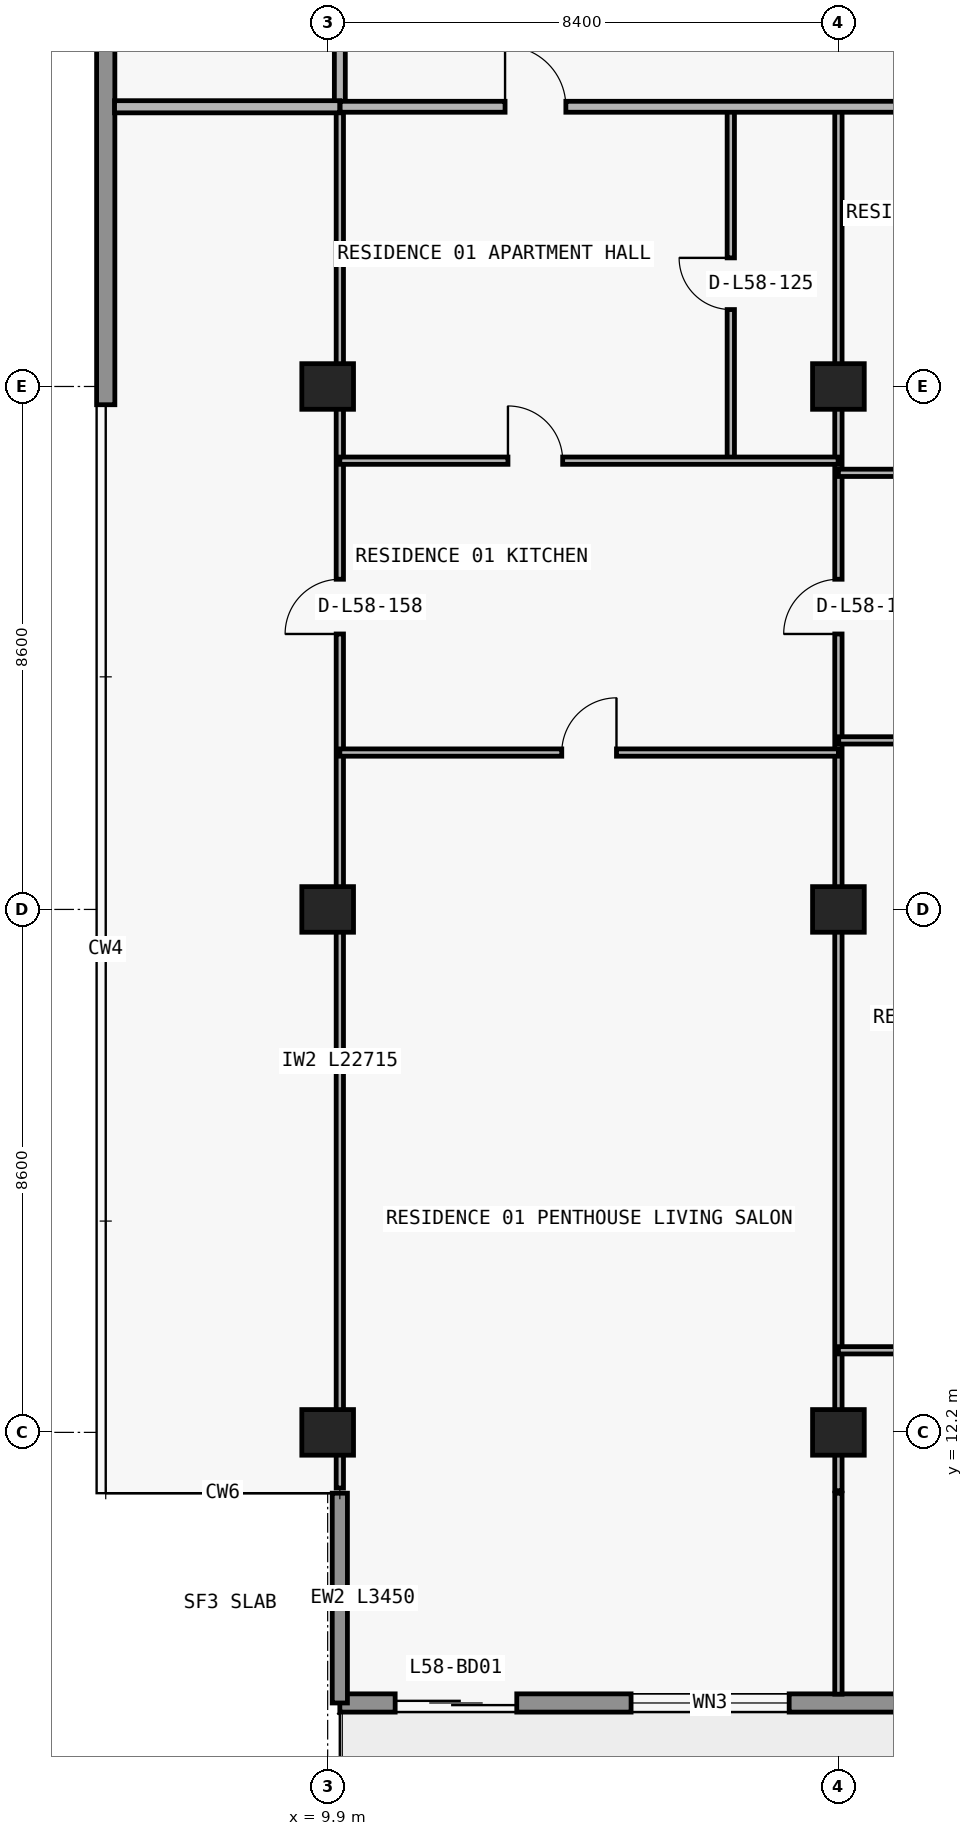
"""IFC4 building model, lengths in metres.
Left out: names, types, materials, properties, quantities, classifications, styles, units other than length and angle.
Written with IfcOpenShell. Run it as: python <this file> out.ifc"""

import sys

from ifc_helpers import new_model, si_unit, direction, frame, frame_2d, origin, origin_2d, place, context, subcontext, project, spatial, rectangle, extrude, element, fill, save


model = new_model("IFC4")
c1 = context("Model", 3, precision=1e-05, world=origin(), true_north=direction((0.0, 1.0)))
c2 = subcontext(c1, "Body", "Model", "MODEL_VIEW")
j1 = project(units=[si_unit("LENGTHUNIT", "METRE"), si_unit("PLANEANGLEUNIT", "RADIAN")], contexts=[c1])
p1 = place(None, origin())
s1 = spatial("IfcSite", under=j1, at=p1, CompositionType="ELEMENT")
p2 = place(p1, origin())
s2 = spatial("IfcBuilding", under=s1, at=p2, CompositionType="ELEMENT")
p3 = place(p2, frame((0.0, 0.0, 208.2)))
s3 = spatial("IfcBuildingStorey", under=s2, at=p3, CompositionType="ELEMENT", Elevation=208.2)
for number, where, z_axis, x_axis in (
    (1, (9.9, 12.2, 0.0), (0.0, 0.0, 1.0), (1.0, 0.0, 0.0)),
    (2, (18.3, 12.2, 0.0), (0.0, 0.0, 1.0), (1.0, 0.0, 0.0)),
    (3, (9.9, 20.8, 0.0), (0.0, 0.0, 1.0), (1.0, 0.0, 0.0)),
    (4, (18.3, 20.8, 0.0), (0.0, 0.0, 1.0), (1.0, 0.0, 0.0)),
    (5, (9.9, 29.4, 0.0), (0.0, 0.0, 1.0), (1.0, 0.0, 0.0)),
    (6, (18.3, 29.4, 0.0), (0.0, 0.0, 1.0), (1.0, 0.0, 0.0)),
):
    element("IfcColumn", number, at=place(p3, frame(where, z_axis=z_axis, x_axis=x_axis)), inside=s3, PredefinedType="COLUMN", context=c2, shape_type="SweptSolid", body=[
        extrude(rectangle(XDim=0.85, YDim=0.75, at=origin_2d()), origin(), (0.0, 0.0, 1.0), 3.05),
    ])
p4 = place(p3, frame((67.7, 7.75, 0.0), z_axis=(0.0, 0.0, 1.0), x_axis=(-1.0, 0.0, 0.0)))
e7 = element("IfcWall", 7, at=p4, inside=s3, PredefinedType="STANDARD", context=c2, shape_type="SweptSolid", body=[
    extrude(rectangle(XDim=57.6, YDim=0.3, at=frame_2d((28.8, 0.0))), origin(), (0.0, 0.0, 1.0), 3.05),
])
p5 = place(p4, frame((54.69, 0.0, 0.0)))
e8 = element("IfcOpeningElement", 8, at=p5, cuts=e7, PredefinedType="OPENING", context=c2, shape_type="SweptSolid", body=[
    extrude(rectangle(XDim=2.0, YDim=2.3, at=frame_2d((1.0, 1.15))), frame((0.0, 0.16, 0.0), z_axis=(0.0, -1.0, 0.0), x_axis=(1.0, 0.0, 0.0)), (0.0, 0.0, 1.0), 0.32),
])
p6 = place(p4, frame((50.21, 0.0, 0.65)))
e9 = element("IfcOpeningElement", 9, at=p6, cuts=e7, PredefinedType="OPENING", context=c2, shape_type="SweptSolid", body=[
    extrude(rectangle(XDim=2.6, YDim=1.85, at=frame_2d((1.3, 0.925))), frame((0.0, 0.16, 0.0), z_axis=(0.0, -1.0, 0.0), x_axis=(1.0, 0.0, 0.0)), (0.0, 0.0, 1.0), 0.32),
])
p7 = place(p4, frame((44.1, 0.0, 0.85)))
e10 = element("IfcOpeningElement", 10, at=p7, cuts=e7, PredefinedType="OPENING", context=c2, shape_type="SweptSolid", body=[
    extrude(rectangle(XDim=2.2, YDim=1.55, at=frame_2d((1.1, 0.775))), frame((0.0, 0.16, 0.0), z_axis=(0.0, -1.0, 0.0), x_axis=(1.0, 0.0, 0.0)), (0.0, 0.0, 1.0), 0.32),
])
p8 = place(p4, frame((38.09, 0.0, 0.0)))
e11 = element("IfcOpeningElement", 11, at=p8, cuts=e7, PredefinedType="OPENING", context=c2, shape_type="SweptSolid", body=[
    extrude(rectangle(XDim=2.0, YDim=2.3, at=frame_2d((1.0, 1.15))), frame((0.0, 0.16, 0.0), z_axis=(0.0, -1.0, 0.0), x_axis=(1.0, 0.0, 0.0)), (0.0, 0.0, 1.0), 0.32),
])
p9 = place(p4, frame((33.41, 0.0, 0.65)))
e12 = element("IfcOpeningElement", 12, at=p9, cuts=e7, PredefinedType="OPENING", context=c2, shape_type="SweptSolid", body=[
    extrude(rectangle(XDim=2.6, YDim=1.85, at=frame_2d((1.3, 0.925))), frame((0.0, 0.16, 0.0), z_axis=(0.0, -1.0, 0.0), x_axis=(1.0, 0.0, 0.0)), (0.0, 0.0, 1.0), 0.32),
])
p10 = place(p4, frame((27.7, 0.0, 0.85)))
e13 = element("IfcOpeningElement", 13, at=p10, cuts=e7, PredefinedType="OPENING", context=c2, shape_type="SweptSolid", body=[
    extrude(rectangle(XDim=2.2, YDim=1.55, at=frame_2d((1.1, 0.775))), frame((0.0, 0.16, 0.0), z_axis=(0.0, -1.0, 0.0), x_axis=(1.0, 0.0, 0.0)), (0.0, 0.0, 1.0), 0.32),
])
p11 = place(p4, frame((19.7, 0.0, 0.85)))
e14 = element("IfcOpeningElement", 14, at=p11, cuts=e7, PredefinedType="OPENING", context=c2, shape_type="SweptSolid", body=[
    extrude(rectangle(XDim=2.2, YDim=1.55, at=frame_2d((1.1, 0.775))), frame((0.0, 0.16, 0.0), z_axis=(0.0, -1.0, 0.0), x_axis=(1.0, 0.0, 0.0)), (0.0, 0.0, 1.0), 0.32),
])
p12 = place(p4, frame((13.69, 0.0, 0.0)))
e15 = element("IfcOpeningElement", 15, at=p12, cuts=e7, PredefinedType="OPENING", context=c2, shape_type="SweptSolid", body=[
    extrude(rectangle(XDim=2.0, YDim=2.3, at=frame_2d((1.0, 1.15))), frame((0.0, 0.16, 0.0), z_axis=(0.0, -1.0, 0.0), x_axis=(1.0, 0.0, 0.0)), (0.0, 0.0, 1.0), 0.32),
])
p13 = place(p4, frame((9.01, 0.0, 0.65)))
e16 = element("IfcOpeningElement", 16, at=p13, cuts=e7, PredefinedType="OPENING", context=c2, shape_type="SweptSolid", body=[
    extrude(rectangle(XDim=2.6, YDim=1.85, at=frame_2d((1.3, 0.925))), frame((0.0, 0.16, 0.0), z_axis=(0.0, -1.0, 0.0), x_axis=(1.0, 0.0, 0.0)), (0.0, 0.0, 1.0), 0.32),
])
p14 = place(p4, frame((3.0, 0.0, 0.85)))
e17 = element("IfcOpeningElement", 17, at=p14, cuts=e7, PredefinedType="OPENING", context=c2, shape_type="SweptSolid", body=[
    extrude(rectangle(XDim=2.2, YDim=1.55, at=frame_2d((1.1, 0.775))), frame((0.0, 0.16, 0.0), z_axis=(0.0, -1.0, 0.0), x_axis=(1.0, 0.0, 0.0)), (0.0, 0.0, 1.0), 0.32),
])
p15 = place(p3, frame((10.1, 11.2, 0.0), z_axis=(0.0, 0.0, 1.0), x_axis=(0.0, -1.0, 0.0)))
e18 = element("IfcWall", 18, at=p15, inside=s3, PredefinedType="ELEMENTEDWALL", context=c2, shape_type="SweptSolid", body=[
    extrude(rectangle(XDim=3.45, YDim=0.25, at=frame_2d((1.725, 0.0))), origin(), (0.0, 0.0, 1.0), 3.05),
])
p16 = place(p3, frame((6.25, 29.1, 0.0), z_axis=(0.0, 0.0, 1.0), x_axis=(0.0, 1.0, 0.0)))
e19 = element("IfcWall", 19, at=p16, inside=s3, PredefinedType="STANDARD", context=c2, shape_type="SweptSolid", body=[
    extrude(rectangle(XDim=17.9, YDim=0.3, at=frame_2d((8.95, 0.0))), origin(), (0.0, 0.0, 1.0), 3.05),
])
p17 = place(p3, frame((10.1, 11.285, 0.0), z_axis=(0.0, 0.0, 1.0), x_axis=(0.0, 1.0, 0.0)))
e20 = element("IfcWall", 20, at=p17, inside=s3, PredefinedType="PARTITIONING", context=c2, shape_type="SweptSolid", body=[
    extrude(rectangle(XDim=22.715, YDim=0.12, at=frame_2d((11.357, 0.0))), origin(), (0.0, 0.0, 1.0), 2.263),
])
p18 = place(p17, frame((14.045, 0.0, 0.0)))
e21 = element("IfcOpeningElement", 21, at=p18, cuts=e20, PredefinedType="OPENING", context=c2, shape_type="SweptSolid", body=[
    extrude(rectangle(XDim=0.9, YDim=2.15, at=frame_2d((0.45, 1.075))), frame((0.0, 0.07, 0.0), z_axis=(0.0, -1.0, 0.0), x_axis=(1.0, 0.0, 0.0)), (0.0, 0.0, 1.0), 0.14),
])
p19 = place(p3, frame((10.1, 34.005, 0.0), z_axis=(0.0, 0.0, 1.0), x_axis=(0.0, 1.0, 0.0)))
e22 = element("IfcWall", 22, at=p19, inside=s3, PredefinedType="PARTITIONING", context=c2, shape_type="SweptSolid", body=[
    extrude(rectangle(XDim=2.995, YDim=0.18, at=frame_2d((1.498, 0.0))), origin(), (0.0, 0.0, 1.0), 2.263),
])
p20 = place(p3, frame((16.53, 28.18, 0.0), z_axis=(0.0, 0.0, 1.0), x_axis=(0.0, 1.0, 0.0)))
e23 = element("IfcWall", 23, at=p20, inside=s3, PredefinedType="PARTITIONING", context=c2, shape_type="SweptSolid", body=[
    extrude(rectangle(XDim=5.82, YDim=0.12, at=frame_2d((2.91, 0.0))), origin(), (0.0, 0.0, 1.0), 3.05),
])
p21 = place(p20, frame((2.485, 0.0, 0.0)))
e24 = element("IfcOpeningElement", 24, at=p21, cuts=e23, PredefinedType="OPENING", context=c2, shape_type="SweptSolid", body=[
    extrude(rectangle(XDim=0.85, YDim=2.1, at=frame_2d((0.425, 1.05))), frame((0.0, 0.07, 0.0), z_axis=(0.0, -1.0, 0.0), x_axis=(1.0, 0.0, 0.0)), (0.0, 0.0, 1.0), 0.14),
])
p22 = place(p3, frame((18.3, 7.895, 0.0), z_axis=(0.0, 0.0, 1.0), x_axis=(0.0, 1.0, 0.0)))
e25 = element("IfcWall", 25, at=p22, inside=s3, PredefinedType="PARTITIONING", context=c2, shape_type="SweptSolid", body=[
    extrude(rectangle(XDim=3.305, YDim=0.12, at=frame_2d((1.652, 0.0))), origin(), (0.0, 0.0, 1.0), 3.05),
])
p23 = place(p3, frame((18.3, 11.24, 0.0), z_axis=(0.0, 0.0, 1.0), x_axis=(0.0, 1.0, 0.0)))
e26 = element("IfcWall", 26, at=p23, inside=s3, PredefinedType="PARTITIONING", context=c2, shape_type="SweptSolid", body=[
    extrude(rectangle(XDim=22.76, YDim=0.12, at=frame_2d((11.38, 0.0))), origin(), (0.0, 0.0, 1.0), 2.263),
])
p24 = place(p23, frame((14.09, 0.0, 0.0)))
e27 = element("IfcOpeningElement", 27, at=p24, cuts=e26, PredefinedType="OPENING", context=c2, shape_type="SweptSolid", body=[
    extrude(rectangle(XDim=0.9, YDim=2.15, at=frame_2d((0.45, 1.075))), frame((0.0, 0.07, 0.0), z_axis=(0.0, -1.0, 0.0), x_axis=(1.0, 0.0, 0.0)), (0.0, 0.0, 1.0), 0.14),
])
p25 = place(p3, frame((18.3, 13.55, 0.0), z_axis=(0.0, 0.0, 1.0), x_axis=(1.0, 0.0, 0.0)))
e28 = element("IfcWall", 28, at=p25, inside=s3, PredefinedType="PARTITIONING", context=c2, shape_type="SweptSolid", body=[
    extrude(rectangle(XDim=8.35, YDim=0.12, at=frame_2d((4.175, 0.0))), origin(), (0.0, 0.0, 1.0), 3.05),
])
p26 = place(p25, frame((3.725, 0.0, 0.0)))
e29 = element("IfcOpeningElement", 29, at=p26, cuts=e28, PredefinedType="OPENING", context=c2, shape_type="SweptSolid", body=[
    extrude(rectangle(XDim=0.9, YDim=2.15, at=frame_2d((0.45, 1.075))), frame((0.0, 0.07, 0.0), z_axis=(0.0, -1.0, 0.0), x_axis=(1.0, 0.0, 0.0)), (0.0, 0.0, 1.0), 0.14),
])
p27 = place(p3, frame((10.1, 23.38, 0.0), z_axis=(0.0, 0.0, 1.0), x_axis=(1.0, 0.0, 0.0)))
e30 = element("IfcWall", 30, at=p27, inside=s3, PredefinedType="PARTITIONING", context=c2, shape_type="SweptSolid", body=[
    extrude(rectangle(XDim=8.2, YDim=0.12, at=frame_2d((4.1, 0.0))), origin(), (0.0, 0.0, 1.0), 3.05),
])
p28 = place(p27, frame((3.65, 0.0, 0.0)))
e31 = element("IfcOpeningElement", 31, at=p28, cuts=e30, PredefinedType="OPENING", context=c2, shape_type="SweptSolid", body=[
    extrude(rectangle(XDim=0.9, YDim=2.15, at=frame_2d((0.45, 1.075))), frame((0.0, 0.07, 0.0), z_axis=(0.0, -1.0, 0.0), x_axis=(1.0, 0.0, 0.0)), (0.0, 0.0, 1.0), 0.14),
])
p29 = place(p3, frame((18.305, 23.58, 0.0), z_axis=(0.0, 0.0, 1.0), x_axis=(1.0, 0.0, 0.0)))
e32 = element("IfcWall", 32, at=p29, inside=s3, PredefinedType="PARTITIONING", context=c2, shape_type="SweptSolid", body=[
    extrude(rectangle(XDim=8.175, YDim=0.12, at=frame_2d((4.087, 0.0))), origin(), (0.0, 0.0, 1.0), 3.05),
])
p30 = place(p29, frame((3.637, 0.0, 0.0)))
e33 = element("IfcOpeningElement", 33, at=p30, cuts=e32, PredefinedType="OPENING", context=c2, shape_type="SweptSolid", body=[
    extrude(rectangle(XDim=0.9, YDim=2.15, at=frame_2d((0.45, 1.075))), frame((0.0, 0.07, 0.0), z_axis=(0.0, -1.0, 0.0), x_axis=(1.0, 0.0, 0.0)), (0.0, 0.0, 1.0), 0.14),
])
p31 = place(p3, frame((18.3, 27.98, 0.0), z_axis=(0.0, 0.0, 1.0), x_axis=(1.0, 0.0, 0.0)))
e34 = element("IfcWall", 34, at=p31, inside=s3, PredefinedType="PARTITIONING", context=c2, shape_type="SweptSolid", body=[
    extrude(rectangle(XDim=8.18, YDim=0.12, at=frame_2d((4.09, 0.0))), origin(), (0.0, 0.0, 1.0), 3.05),
])
p32 = place(p31, frame((2.952, 0.0, 0.0)))
e35 = element("IfcOpeningElement", 35, at=p32, cuts=e34, PredefinedType="OPENING", context=c2, shape_type="SweptSolid", body=[
    extrude(rectangle(XDim=0.9, YDim=2.15, at=frame_2d((0.45, 1.075))), frame((0.0, 0.07, 0.0), z_axis=(0.0, -1.0, 0.0), x_axis=(1.0, 0.0, 0.0)), (0.0, 0.0, 1.0), 0.14),
])
p33 = place(p3, frame((10.1, 28.18, 0.0), z_axis=(0.0, 0.0, 1.0), x_axis=(1.0, 0.0, 0.0)))
e36 = element("IfcWall", 36, at=p33, inside=s3, PredefinedType="PARTITIONING", context=c2, shape_type="SweptSolid", body=[
    extrude(rectangle(XDim=8.195, YDim=0.12, at=frame_2d((4.097, 0.0))), origin(), (0.0, 0.0, 1.0), 3.05),
])
p34 = place(p33, frame((2.765, 0.0, 0.0)))
e37 = element("IfcOpeningElement", 37, at=p34, cuts=e36, PredefinedType="OPENING", context=c2, shape_type="SweptSolid", body=[
    extrude(rectangle(XDim=0.9, YDim=2.15, at=frame_2d((0.45, 1.075))), frame((0.0, 0.07, 0.0), z_axis=(0.0, -1.0, 0.0), x_axis=(1.0, 0.0, 0.0)), (0.0, 0.0, 1.0), 0.14),
])
p35 = place(p3, frame((6.395, 34.0, 0.0), z_axis=(0.0, 0.0, 1.0), x_axis=(1.0, 0.0, 0.0)))
e38 = element("IfcWall", 38, at=p35, inside=s3, PredefinedType="PARTITIONING", context=c2, shape_type="SweptSolid", body=[
    extrude(rectangle(XDim=3.705, YDim=0.2, at=frame_2d((1.853, 0.0))), origin(), (0.0, 0.0, 1.0), 3.05),
])
p36 = place(p3, frame((10.105, 34.0, 0.0), z_axis=(0.0, 0.0, 1.0), x_axis=(1.0, 0.0, 0.0)))
e39 = element("IfcWall", 39, at=p36, inside=s3, PredefinedType="PARTITIONING", context=c2, shape_type="SweptSolid", body=[
    extrude(rectangle(XDim=16.545, YDim=0.18, at=frame_2d((8.272, 0.0))), origin(), (0.0, 0.0, 1.0), 3.05),
])
p37 = place(p36, frame((2.712, 0.0, 0.0)))
e40 = element("IfcOpeningElement", 40, at=p37, cuts=e39, PredefinedType="OPENING", context=c2, shape_type="SweptSolid", body=[
    extrude(rectangle(XDim=1.0, YDim=2.2, at=frame_2d((0.5, 1.1))), frame((0.0, 0.1, 0.0), z_axis=(0.0, -1.0, 0.0), x_axis=(1.0, 0.0, 0.0)), (0.0, 0.0, 1.0), 0.2),
])
p38 = place(p5, origin())
e41 = element("IfcDoor", 41, at=p38, inside=s3, OperationType="DOUBLE_DOOR_SLIDING", PredefinedType="DOOR", context=c2, shape_type="SweptSolid", body=[
    extrude(rectangle(XDim=2.0, YDim=2.3, at=frame_2d((1.0, 1.15))), frame((0.0, 0.025, 0.0), z_axis=(0.0, -1.0, 0.0), x_axis=(1.0, 0.0, 0.0)), (0.0, 0.0, 1.0), 0.05),
])
fill(e8, e41)
p39 = place(p6, origin())
e42 = element("IfcWindow", 42, at=p39, inside=s3, PartitioningType="SINGLE_PANEL", PredefinedType="WINDOW", context=c2, shape_type="SweptSolid", body=[
    extrude(rectangle(XDim=2.6, YDim=1.85, at=frame_2d((1.3, 0.925))), frame((0.0, 0.03, 0.0), z_axis=(0.0, -1.0, 0.0), x_axis=(1.0, 0.0, 0.0)), (0.0, 0.0, 1.0), 0.06),
])
fill(e9, e42)
p40 = place(p37, origin())
e43 = element("IfcDoor", 43, at=p40, inside=s3, OperationType="SINGLE_SWING_LEFT", PredefinedType="DOOR", context=c2, shape_type="SweptSolid", body=[
    extrude(rectangle(XDim=1.0, YDim=2.2, at=frame_2d((0.5, 1.1))), frame((0.0, 0.025, 0.0), z_axis=(0.0, -1.0, 0.0), x_axis=(1.0, 0.0, 0.0)), (0.0, 0.0, 1.0), 0.05),
])
fill(e40, e43)
p41 = place(p21, origin())
e44 = element("IfcDoor", 44, at=p41, inside=s3, OperationType="SINGLE_SWING_RIGHT", PredefinedType="DOOR", context=c2, shape_type="SweptSolid", body=[
    extrude(rectangle(XDim=0.85, YDim=2.1, at=frame_2d((0.425, 1.05))), frame((0.0, 0.025, 0.0), z_axis=(0.0, -1.0, 0.0), x_axis=(1.0, 0.0, 0.0)), (0.0, 0.0, 1.0), 0.05),
])
fill(e24, e44)
p42 = place(p34, origin())
e45 = element("IfcDoor", 45, at=p42, inside=s3, OperationType="SINGLE_SWING_LEFT", PredefinedType="DOOR", context=c2, shape_type="SweptSolid", body=[
    extrude(rectangle(XDim=0.9, YDim=2.15, at=frame_2d((0.45, 1.075))), frame((0.0, 0.025, 0.0), z_axis=(0.0, -1.0, 0.0), x_axis=(1.0, 0.0, 0.0)), (0.0, 0.0, 1.0), 0.05),
])
fill(e37, e45)
p43 = place(p28, origin())
e46 = element("IfcDoor", 46, at=p43, inside=s3, OperationType="SINGLE_SWING_RIGHT", PredefinedType="DOOR", context=c2, shape_type="SweptSolid", body=[
    extrude(rectangle(XDim=0.9, YDim=2.15, at=frame_2d((0.45, 1.075))), frame((0.0, 0.025, 0.0), z_axis=(0.0, -1.0, 0.0), x_axis=(1.0, 0.0, 0.0)), (0.0, 0.0, 1.0), 0.05),
])
fill(e31, e46)
p44 = place(p24, origin())
e47 = element("IfcDoor", 47, at=p44, inside=s3, OperationType="SINGLE_SWING_LEFT", PredefinedType="DOOR", context=c2, shape_type="SweptSolid", body=[
    extrude(rectangle(XDim=0.9, YDim=2.15, at=frame_2d((0.45, 1.075))), frame((0.0, 0.025, 0.0), z_axis=(0.0, -1.0, 0.0), x_axis=(1.0, 0.0, 0.0)), (0.0, 0.0, 1.0), 0.05),
])
fill(e27, e47)
p45 = place(p18, origin())
e48 = element("IfcDoor", 48, at=p45, inside=s3, OperationType="SINGLE_SWING_LEFT", PredefinedType="DOOR", context=c2, shape_type="SweptSolid", body=[
    extrude(rectangle(XDim=0.9, YDim=2.15, at=frame_2d((0.45, 1.075))), frame((0.0, 0.025, 0.0), z_axis=(0.0, -1.0, 0.0), x_axis=(1.0, 0.0, 0.0)), (0.0, 0.0, 1.0), 0.05),
])
fill(e21, e48)
save(model, sys.argv[1])
